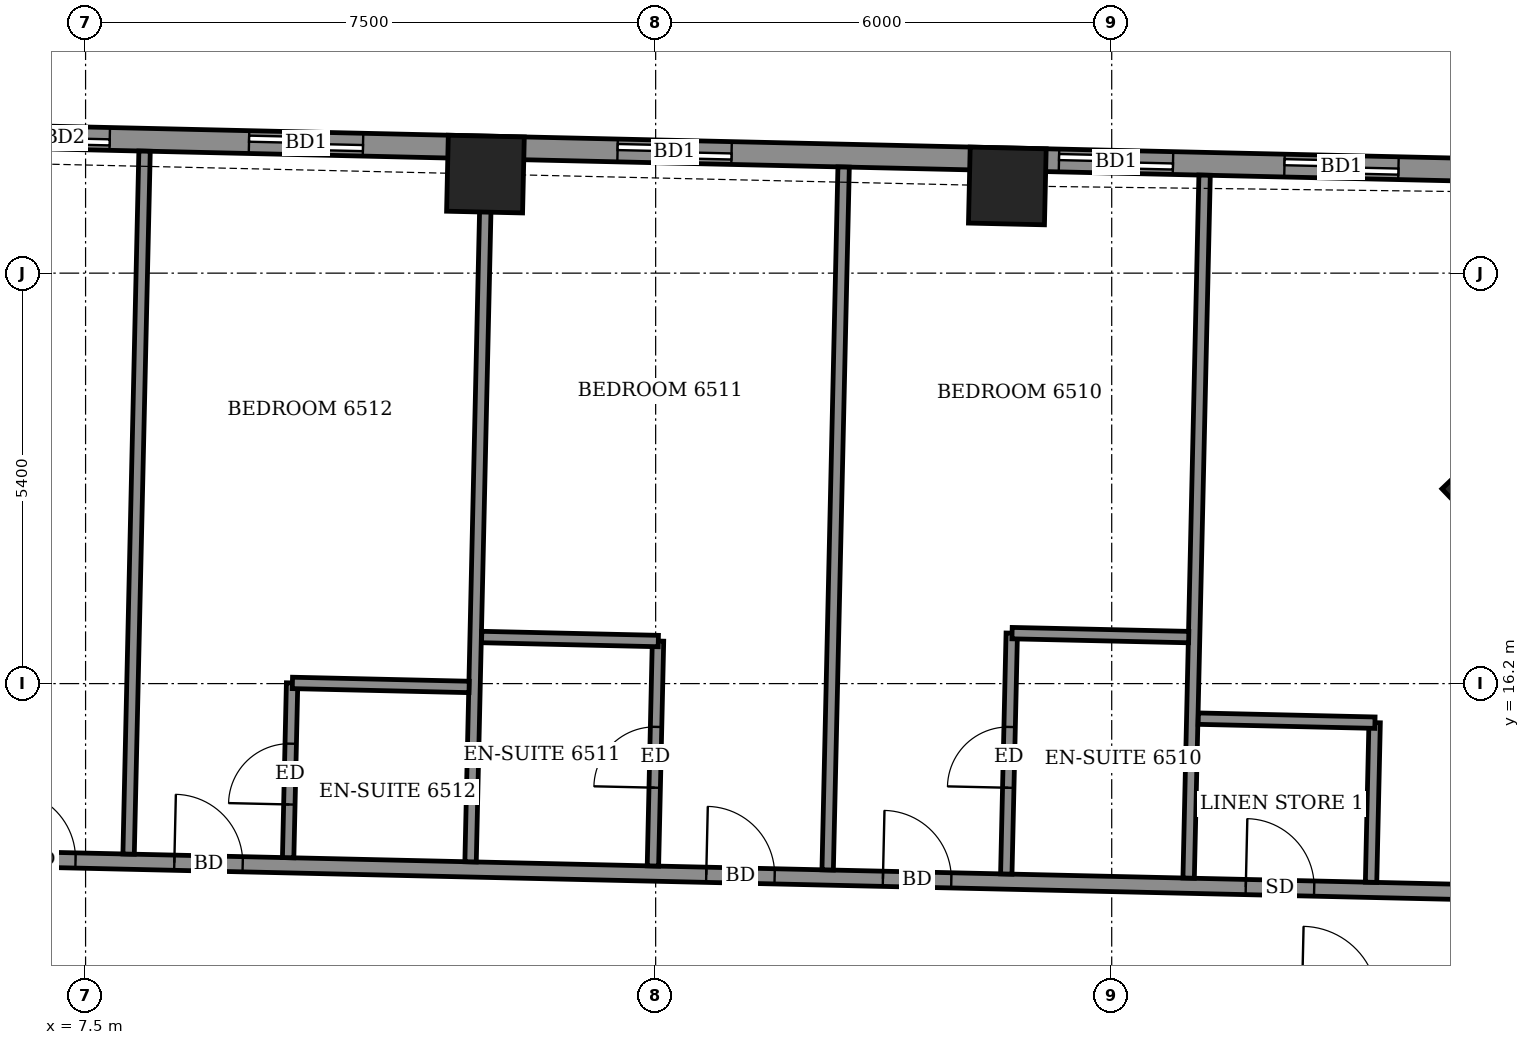
"""IFC4 building model, lengths in metres.
Left out: names, types, materials, properties, quantities, classifications, styles, units other than length and angle.
Written with IfcOpenShell. Run it as: python <this file> out.ifc"""

import sys

from ifc_helpers import new_model, si_unit, direction, frame, frame_2d, origin, origin_2d, place, context, subcontext, project, spatial, rectangle, extrude, element, fill, save


model = new_model("IFC4")
c1 = context("Model", 3, precision=1e-05, world=origin(), true_north=direction((0.0, 1.0)))
c2 = subcontext(c1, "Body", "Model", "MODEL_VIEW")
j1 = project(units=[si_unit("LENGTHUNIT", "METRE"), si_unit("PLANEANGLEUNIT", "RADIAN")], contexts=[c1])
p1 = place(None, origin())
s1 = spatial("IfcSite", under=j1, at=p1, CompositionType="ELEMENT")
p2 = place(p1, origin())
s2 = spatial("IfcBuilding", under=s1, at=p2, CompositionType="ELEMENT")
p3 = place(p2, frame((0.0, 0.0, 257.3)))
s3 = spatial("IfcBuildingStorey", under=s2, at=p3, CompositionType="ELEMENT", Elevation=257.3)
for number, where, z_axis, x_axis in (
    (1, (26.052, 18.747, -0.55), (0.0, 0.0, 1.0), (-0.691, 0.723, 0.0)),
    (2, (19.627, 22.747, -0.55), (0.0, 0.0, 1.0), (-1.0, 0.023, 0.0)),
    (3, (12.761, 22.903, -0.55), (0.0, 0.0, 1.0), (-1.0, 0.023, 0.0)),
):
    element("IfcColumn", number, at=place(p3, frame(where, z_axis=z_axis, x_axis=x_axis)), inside=s3, PredefinedType="COLUMN", context=c2, shape_type="SweptSolid", body=[
        extrude(rectangle(XDim=1.0, YDim=1.0, at=origin_2d()), origin(), (0.0, 0.0, 1.0), 3.6),
    ])
p4 = place(p3, frame((26.35, 22.945, 0.0), z_axis=(0.0, 0.0, 1.0), x_axis=(-0.999742523712, 0.022691105788, 0.0)))
e4 = element("IfcWall", 4, at=p4, inside=s3, PredefinedType="SOLIDWALL", context=c2, shape_type="SweptSolid", body=[
    extrude(rectangle(XDim=47.771, YDim=0.3, at=frame_2d((23.886, 0.0))), origin(), (0.0, 0.0, 1.0), 2.55),
])
p5 = place(p4, frame((1.578, 0.0, 0.0)))
e5 = element("IfcOpeningElement", 5, at=p5, cuts=e4, PredefinedType="OPENING", context=c2, shape_type="SweptSolid", body=[
    extrude(rectangle(XDim=1.5, YDim=2.4, at=frame_2d((0.75, 1.2))), frame((0.0, 0.16, 0.0), z_axis=(0.0, -1.0, 0.0), x_axis=(1.0, 0.0, 0.0)), (0.0, 0.0, 1.0), 0.32),
])
p6 = place(p4, frame((4.545, 0.0, 0.0)))
e6 = element("IfcOpeningElement", 6, at=p6, cuts=e4, PredefinedType="OPENING", context=c2, shape_type="SweptSolid", body=[
    extrude(rectangle(XDim=1.5, YDim=2.4, at=frame_2d((0.75, 1.2))), frame((0.0, 0.16, 0.0), z_axis=(0.0, -1.0, 0.0), x_axis=(1.0, 0.0, 0.0)), (0.0, 0.0, 1.0), 0.32),
])
p7 = place(p4, frame((10.354, 0.0, 0.0)))
e7 = element("IfcOpeningElement", 7, at=p7, cuts=e4, PredefinedType="OPENING", context=c2, shape_type="SweptSolid", body=[
    extrude(rectangle(XDim=1.5, YDim=2.4, at=frame_2d((0.75, 1.2))), frame((0.0, 0.16, 0.0), z_axis=(0.0, -1.0, 0.0), x_axis=(1.0, 0.0, 0.0)), (0.0, 0.0, 1.0), 0.32),
])
p8 = place(p4, frame((15.204, 0.0, 0.0)))
e8 = element("IfcOpeningElement", 8, at=p8, cuts=e4, PredefinedType="OPENING", context=c2, shape_type="SweptSolid", body=[
    extrude(rectangle(XDim=1.5, YDim=2.4, at=frame_2d((0.75, 1.2))), frame((0.0, 0.16, 0.0), z_axis=(0.0, -1.0, 0.0), x_axis=(1.0, 0.0, 0.0)), (0.0, 0.0, 1.0), 0.32),
])
p9 = place(p4, frame((18.537, 0.0, 0.0)))
e9 = element("IfcOpeningElement", 9, at=p9, cuts=e4, PredefinedType="OPENING", context=c2, shape_type="SweptSolid", body=[
    extrude(rectangle(XDim=1.2, YDim=2.4, at=frame_2d((0.6, 1.2))), frame((0.0, 0.16, 0.0), z_axis=(0.0, -1.0, 0.0), x_axis=(1.0, 0.0, 0.0)), (0.0, 0.0, 1.0), 0.32),
])
p10 = place(p4, frame((24.171, 0.0, 0.0)))
e10 = element("IfcOpeningElement", 10, at=p10, cuts=e4, PredefinedType="OPENING", context=c2, shape_type="SweptSolid", body=[
    extrude(rectangle(XDim=1.5, YDim=2.4, at=frame_2d((0.75, 1.2))), frame((0.0, 0.16, 0.0), z_axis=(0.0, -1.0, 0.0), x_axis=(1.0, 0.0, 0.0)), (0.0, 0.0, 1.0), 0.32),
])
p11 = place(p4, frame((28.871, 0.0, 0.0)))
e11 = element("IfcOpeningElement", 11, at=p11, cuts=e4, PredefinedType="OPENING", context=c2, shape_type="SweptSolid", body=[
    extrude(rectangle(XDim=1.5, YDim=2.4, at=frame_2d((0.75, 1.2))), frame((0.0, 0.16, 0.0), z_axis=(0.0, -1.0, 0.0), x_axis=(1.0, 0.0, 0.0)), (0.0, 0.0, 1.0), 0.32),
])
p12 = place(p4, frame((32.055, 0.0, 0.0)))
e12 = element("IfcOpeningElement", 12, at=p12, cuts=e4, PredefinedType="OPENING", context=c2, shape_type="SweptSolid", body=[
    extrude(rectangle(XDim=1.5, YDim=2.4, at=frame_2d((0.75, 1.2))), frame((0.0, 0.16, 0.0), z_axis=(0.0, -1.0, 0.0), x_axis=(1.0, 0.0, 0.0)), (0.0, 0.0, 1.0), 0.32),
])
p13 = place(p4, frame((37.813, 0.0, 0.0)))
e13 = element("IfcOpeningElement", 13, at=p13, cuts=e4, PredefinedType="OPENING", context=c2, shape_type="SweptSolid", body=[
    extrude(rectangle(XDim=1.5, YDim=2.4, at=frame_2d((0.75, 1.2))), frame((0.0, 0.16, 0.0), z_axis=(0.0, -1.0, 0.0), x_axis=(1.0, 0.0, 0.0)), (0.0, 0.0, 1.0), 0.32),
])
p14 = place(p4, frame((43.052, 0.0, 0.9)))
e14 = element("IfcOpeningElement", 14, at=p14, cuts=e4, PredefinedType="OPENING", context=c2, shape_type="SweptSolid", body=[
    extrude(rectangle(XDim=2.4, YDim=1.5, at=frame_2d((1.2, 0.75))), frame((0.0, 0.16, 0.0), z_axis=(0.0, -1.0, 0.0), x_axis=(1.0, 0.0, 0.0)), (0.0, 0.0, 1.0), 0.32),
])
p15 = place(p3, frame((-24.474, 14.596, 0.0), z_axis=(0.0, 0.0, 1.0), x_axis=(0.999742424031, -0.022695497208, 0.0)))
e15 = element("IfcWall", 15, at=p15, inside=s3, PredefinedType="PARTITIONING", context=c2, shape_type="SweptSolid", body=[
    extrude(rectangle(XDim=52.872, YDim=0.2, at=frame_2d((26.436, 0.0))), origin(), (0.0, 0.0, 1.0), 3.05),
])
p16 = place(p15, frame((51.336, 0.0, 0.0)))
e16 = element("IfcOpeningElement", 16, at=p16, cuts=e15, PredefinedType="OPENING", context=c2, shape_type="SweptSolid", body=[
    extrude(rectangle(XDim=1.0, YDim=2.1, at=frame_2d((0.5, 1.05))), frame((0.0, 0.11, 0.0), z_axis=(0.0, -1.0, 0.0), x_axis=(1.0, 0.0, 0.0)), (0.0, 0.0, 1.0), 0.22),
])
p17 = place(p15, frame((47.25, 0.0, 0.0)))
e17 = element("IfcOpeningElement", 17, at=p17, cuts=e15, PredefinedType="OPENING", context=c2, shape_type="SweptSolid", body=[
    extrude(rectangle(XDim=0.9, YDim=2.1, at=frame_2d((0.45, 1.05))), frame((0.0, 0.11, 0.0), z_axis=(0.0, -1.0, 0.0), x_axis=(1.0, 0.0, 0.0)), (0.0, 0.0, 1.0), 0.22),
])
p18 = place(p15, frame((42.475, 0.0, 0.0)))
e18 = element("IfcOpeningElement", 18, at=p18, cuts=e15, PredefinedType="OPENING", context=c2, shape_type="SweptSolid", body=[
    extrude(rectangle(XDim=0.9, YDim=2.1, at=frame_2d((0.45, 1.05))), frame((0.0, 0.11, 0.0), z_axis=(0.0, -1.0, 0.0), x_axis=(1.0, 0.0, 0.0)), (0.0, 0.0, 1.0), 0.22),
])
p19 = place(p15, frame((40.15, 0.0, 0.0)))
e19 = element("IfcOpeningElement", 19, at=p19, cuts=e15, PredefinedType="OPENING", context=c2, shape_type="SweptSolid", body=[
    extrude(rectangle(XDim=0.9, YDim=2.1, at=frame_2d((0.45, 1.05))), frame((0.0, 0.11, 0.0), z_axis=(0.0, -1.0, 0.0), x_axis=(1.0, 0.0, 0.0)), (0.0, 0.0, 1.0), 0.22),
])
p20 = place(p15, frame((33.15, 0.0, 0.0)))
e20 = element("IfcOpeningElement", 20, at=p20, cuts=e15, PredefinedType="OPENING", context=c2, shape_type="SweptSolid", body=[
    extrude(rectangle(XDim=0.9, YDim=2.1, at=frame_2d((0.45, 1.05))), frame((0.0, 0.11, 0.0), z_axis=(0.0, -1.0, 0.0), x_axis=(1.0, 0.0, 0.0)), (0.0, 0.0, 1.0), 0.22),
])
p21 = place(p15, frame((30.95, 0.0, 0.0)))
e21 = element("IfcOpeningElement", 21, at=p21, cuts=e15, PredefinedType="OPENING", context=c2, shape_type="SweptSolid", body=[
    extrude(rectangle(XDim=0.9, YDim=2.1, at=frame_2d((0.45, 1.05))), frame((0.0, 0.11, 0.0), z_axis=(0.0, -1.0, 0.0), x_axis=(1.0, 0.0, 0.0)), (0.0, 0.0, 1.0), 0.22),
])
p22 = place(p15, frame((23.975, 0.0, 0.0)))
e22 = element("IfcOpeningElement", 22, at=p22, cuts=e15, PredefinedType="OPENING", context=c2, shape_type="SweptSolid", body=[
    extrude(rectangle(XDim=0.9, YDim=2.1, at=frame_2d((0.45, 1.05))), frame((0.0, 0.11, 0.0), z_axis=(0.0, -1.0, 0.0), x_axis=(1.0, 0.0, 0.0)), (0.0, 0.0, 1.0), 0.22),
])
p23 = place(p15, frame((21.925, 0.0, 0.0)))
e23 = element("IfcOpeningElement", 23, at=p23, cuts=e15, PredefinedType="OPENING", context=c2, shape_type="SweptSolid", body=[
    extrude(rectangle(XDim=0.9, YDim=2.1, at=frame_2d((0.45, 1.05))), frame((0.0, 0.11, 0.0), z_axis=(0.0, -1.0, 0.0), x_axis=(1.0, 0.0, 0.0)), (0.0, 0.0, 1.0), 0.22),
])
p24 = place(p15, frame((14.975, 0.0, 0.0)))
e24 = element("IfcOpeningElement", 24, at=p24, cuts=e15, PredefinedType="OPENING", context=c2, shape_type="SweptSolid", body=[
    extrude(rectangle(XDim=0.9, YDim=2.1, at=frame_2d((0.45, 1.05))), frame((0.0, 0.11, 0.0), z_axis=(0.0, -1.0, 0.0), x_axis=(1.0, 0.0, 0.0)), (0.0, 0.0, 1.0), 0.22),
])
p25 = place(p15, frame((12.65, 0.0, 0.0)))
e25 = element("IfcOpeningElement", 25, at=p25, cuts=e15, PredefinedType="OPENING", context=c2, shape_type="SweptSolid", body=[
    extrude(rectangle(XDim=0.9, YDim=2.1, at=frame_2d((0.45, 1.05))), frame((0.0, 0.11, 0.0), z_axis=(0.0, -1.0, 0.0), x_axis=(1.0, 0.0, 0.0)), (0.0, 0.0, 1.0), 0.22),
])
p26 = place(p15, frame((2.0, 0.0, 0.0)))
e26 = element("IfcOpeningElement", 26, at=p26, cuts=e15, PredefinedType="OPENING", context=c2, shape_type="SweptSolid", body=[
    extrude(rectangle(XDim=1.0, YDim=2.1, at=frame_2d((0.5, 1.05))), frame((0.0, 0.11, 0.0), z_axis=(0.0, -1.0, 0.0), x_axis=(1.0, 0.0, 0.0)), (0.0, 0.0, 1.0), 0.22),
])
p27 = place(p15, frame((7.75, 0.0, 0.0)))
e27 = element("IfcOpeningElement", 27, at=p27, cuts=e15, PredefinedType="OPENING", context=c2, shape_type="SweptSolid", body=[
    extrude(rectangle(XDim=0.9, YDim=2.1, at=frame_2d((0.45, 1.05))), frame((0.0, 0.11, 0.0), z_axis=(0.0, -1.0, 0.0), x_axis=(1.0, 0.0, 0.0)), (0.0, 0.0, 1.0), 0.22),
])
p28 = place(p3, frame((8.066, 13.957, 0.0), z_axis=(0.0, 0.0, 1.0), x_axis=(0.022697424684, 0.999742380272, 0.0)))
e28 = element("IfcWall", 28, at=p28, inside=s3, PredefinedType="PARTITIONING", context=c2, shape_type="SweptSolid", body=[
    extrude(rectangle(XDim=9.25, YDim=0.15, at=frame_2d((4.625, 0.0))), origin(), (0.0, 0.0, 1.0), 2.55),
])
p29 = place(p3, frame((10.165, 13.91, 0.0), z_axis=(0.0, 0.0, 1.0), x_axis=(0.022612884682, 0.999744296031, 0.0)))
e29 = element("IfcWall", 29, at=p29, inside=s3, PredefinedType="PARTITIONING", context=c2, shape_type="SweptSolid", body=[
    extrude(rectangle(XDim=2.3, YDim=0.15, at=frame_2d((1.15, 0.0))), origin(), (0.0, 0.0, 1.0), 3.05),
])
p30 = place(p29, frame((0.7, 0.0, 0.0)))
e30 = element("IfcOpeningElement", 30, at=p30, cuts=e29, PredefinedType="OPENING", context=c2, shape_type="SweptSolid", body=[
    extrude(rectangle(XDim=0.8, YDim=2.1, at=frame_2d((0.4, 1.05))), frame((0.0, 0.085, 0.0), z_axis=(0.0, -1.0, 0.0), x_axis=(1.0, 0.0, 0.0)), (0.0, 0.0, 1.0), 0.17),
])
p31 = place(p3, frame((12.565, 13.855, 0.0), z_axis=(0.0, 0.0, 1.0), x_axis=(0.022591909275, 0.999744770247, 0.0)))
e31 = element("IfcWall", 31, at=p31, inside=s3, PredefinedType="PARTITIONING", context=c2, shape_type="SweptSolid", body=[
    extrude(rectangle(XDim=9.25, YDim=0.15, at=frame_2d((4.625, 0.0))), origin(), (0.0, 0.0, 1.0), 3.05),
])
p32 = place(p3, frame((14.964, 13.801, 0.0), z_axis=(0.0, 0.0, 1.0), x_axis=(0.022601485787, 0.999744553794, 0.0)))
e32 = element("IfcWall", 32, at=p32, inside=s3, PredefinedType="PARTITIONING", context=c2, shape_type="SweptSolid", body=[
    extrude(rectangle(XDim=2.96, YDim=0.15, at=frame_2d((1.48, 0.0))), origin(), (0.0, 0.0, 1.0), 3.05),
])
p33 = place(p32, frame((1.03, 0.0, 0.0)))
e33 = element("IfcOpeningElement", 33, at=p33, cuts=e32, PredefinedType="OPENING", context=c2, shape_type="SweptSolid", body=[
    extrude(rectangle(XDim=0.8, YDim=2.1, at=frame_2d((0.4, 1.05))), frame((0.0, 0.085, 0.0), z_axis=(0.0, -1.0, 0.0), x_axis=(1.0, 0.0, 0.0)), (0.0, 0.0, 1.0), 0.17),
])
p34 = place(p3, frame((17.263, 13.749, 0.0), z_axis=(0.0, 0.0, 1.0), x_axis=(0.022699820474, 0.999742325877, 0.0)))
e34 = element("IfcWall", 34, at=p34, inside=s3, PredefinedType="PARTITIONING", context=c2, shape_type="SweptSolid", body=[
    extrude(rectangle(XDim=9.25, YDim=0.15, at=frame_2d((4.625, 0.0))), origin(), (0.0, 0.0, 1.0), 2.55),
])
p35 = place(p3, frame((19.613, 13.695, 0.0), z_axis=(0.0, 0.0, 1.0), x_axis=(0.022721405353, 0.999741835545, 0.0)))
e35 = element("IfcWall", 35, at=p35, inside=s3, PredefinedType="PARTITIONING", context=c2, shape_type="SweptSolid", body=[
    extrude(rectangle(XDim=3.17, YDim=0.15, at=frame_2d((1.585, 0.0))), origin(), (0.0, 0.0, 1.0), 3.05),
])
p36 = place(p35, frame((1.135, 0.0, 0.0)))
e36 = element("IfcOpeningElement", 36, at=p36, cuts=e35, PredefinedType="OPENING", context=c2, shape_type="SweptSolid", body=[
    extrude(rectangle(XDim=0.8, YDim=2.1, at=frame_2d((0.4, 1.05))), frame((0.0, 0.085, 0.0), z_axis=(0.0, -1.0, 0.0), x_axis=(1.0, 0.0, 0.0)), (0.0, 0.0, 1.0), 0.17),
])
p37 = place(p3, frame((22.012, 13.641, 0.0), z_axis=(0.0, 0.0, 1.0), x_axis=(0.022698023584, 0.999742366675, 0.0)))
e37 = element("IfcWall", 37, at=p37, inside=s3, PredefinedType="PARTITIONING", context=c2, shape_type="SweptSolid", body=[
    extrude(rectangle(XDim=9.25, YDim=0.15, at=frame_2d((4.625, 0.0))), origin(), (0.0, 0.0, 1.0), 2.55),
])
p38 = place(p3, frame((24.412, 13.586, 0.0), z_axis=(0.0, 0.0, 1.0), x_axis=(0.022314832676, 0.999750993119, 0.0)))
e38 = element("IfcWall", 38, at=p38, inside=s3, PredefinedType="PARTITIONING", context=c2, shape_type="SweptSolid", body=[
    extrude(rectangle(XDim=2.101, YDim=0.15, at=frame_2d((1.05, 0.0))), origin(), (0.0, 0.0, 1.0), 3.05),
])
p39 = place(p3, frame((22.139, 15.739, 0.0), z_axis=(0.0, 0.0, 1.0), x_axis=(0.999740260747, -0.02279059109, 0.0)))
e39 = element("IfcWall", 39, at=p39, inside=s3, PredefinedType="PARTITIONING", context=c2, shape_type="SweptSolid", body=[
    extrude(rectangle(XDim=2.324, YDim=0.15, at=frame_2d((1.162, 0.0))), origin(), (0.0, 0.0, 1.0), 3.05),
])
p40 = place(p3, frame((10.221, 16.209, 0.0), z_axis=(0.0, 0.0, 1.0), x_axis=(0.999740478815, -0.022781023197, 0.0)))
e40 = element("IfcWall", 40, at=p40, inside=s3, PredefinedType="PARTITIONING", context=c2, shape_type="SweptSolid", body=[
    extrude(rectangle(XDim=2.325, YDim=0.15, at=frame_2d((1.163, 0.0))), origin(), (0.0, 0.0, 1.0), 3.05),
])
for number, where, z_axis, x_axis in (
    (41, (12.711, 16.813, 0.0), (0.0, 0.0, 1.0), (1.0, -0.023, 0.0)),
    (42, (19.689, 16.864, 0.0), (0.0, 0.0, 1.0), (1.0, -0.022, 0.0)),
):
    element("IfcWall", number, at=place(p3, frame(where, z_axis=z_axis, x_axis=x_axis)), inside=s3, PredefinedType="PARTITIONING", context=c2, shape_type="SweptSolid", body=[
        extrude(rectangle(XDim=2.324, YDim=0.15, at=frame_2d((1.162, 0.0))), origin(), (0.0, 0.0, 1.0), 3.05),
    ])
p41 = place(p5, origin())
e43 = element("IfcDoor", 43, at=p41, inside=s3, OperationType="SLIDING_TO_LEFT", PredefinedType="DOOR", context=c2, shape_type="SweptSolid", body=[
    extrude(rectangle(XDim=1.5, YDim=2.4, at=frame_2d((0.75, 1.2))), frame((0.0, 0.025, 0.0), z_axis=(0.0, -1.0, 0.0), x_axis=(1.0, 0.0, 0.0)), (0.0, 0.0, 1.0), 0.05),
])
fill(e5, e43)
p42 = place(p6, origin())
e44 = element("IfcDoor", 44, at=p42, inside=s3, OperationType="SLIDING_TO_LEFT", PredefinedType="DOOR", context=c2, shape_type="SweptSolid", body=[
    extrude(rectangle(XDim=1.5, YDim=2.4, at=frame_2d((0.75, 1.2))), frame((0.0, 0.025, 0.0), z_axis=(0.0, -1.0, 0.0), x_axis=(1.0, 0.0, 0.0)), (0.0, 0.0, 1.0), 0.05),
])
fill(e6, e44)
p43 = place(p7, origin())
e45 = element("IfcDoor", 45, at=p43, inside=s3, OperationType="SLIDING_TO_LEFT", PredefinedType="DOOR", context=c2, shape_type="SweptSolid", body=[
    extrude(rectangle(XDim=1.5, YDim=2.4, at=frame_2d((0.75, 1.2))), frame((0.0, 0.025, 0.0), z_axis=(0.0, -1.0, 0.0), x_axis=(1.0, 0.0, 0.0)), (0.0, 0.0, 1.0), 0.05),
])
fill(e7, e45)
p44 = place(p8, origin())
e46 = element("IfcDoor", 46, at=p44, inside=s3, OperationType="SLIDING_TO_LEFT", PredefinedType="DOOR", context=c2, shape_type="SweptSolid", body=[
    extrude(rectangle(XDim=1.5, YDim=2.4, at=frame_2d((0.75, 1.2))), frame((0.0, 0.025, 0.0), z_axis=(0.0, -1.0, 0.0), x_axis=(1.0, 0.0, 0.0)), (0.0, 0.0, 1.0), 0.05),
])
fill(e8, e46)
p45 = place(p9, origin())
e47 = element("IfcDoor", 47, at=p45, inside=s3, OperationType="SLIDING_TO_LEFT", PredefinedType="DOOR", context=c2, shape_type="SweptSolid", body=[
    extrude(rectangle(XDim=1.2, YDim=2.4, at=frame_2d((0.6, 1.2))), frame((0.0, 0.025, 0.0), z_axis=(0.0, -1.0, 0.0), x_axis=(1.0, 0.0, 0.0)), (0.0, 0.0, 1.0), 0.05),
])
fill(e9, e47)
p46 = place(p17, origin())
e48 = element("IfcDoor", 48, at=p46, inside=s3, OperationType="SINGLE_SWING_LEFT", PredefinedType="DOOR", context=c2, shape_type="SweptSolid", body=[
    extrude(rectangle(XDim=0.9, YDim=2.1, at=frame_2d((0.45, 1.05))), frame((0.0, 0.025, 0.0), z_axis=(0.0, -1.0, 0.0), x_axis=(1.0, 0.0, 0.0)), (0.0, 0.0, 1.0), 0.05),
])
fill(e17, e48)
p47 = place(p18, origin())
e49 = element("IfcDoor", 49, at=p47, inside=s3, OperationType="SINGLE_SWING_RIGHT", PredefinedType="DOOR", context=c2, shape_type="SweptSolid", body=[
    extrude(rectangle(XDim=0.9, YDim=2.1, at=frame_2d((0.45, 1.05))), frame((0.0, 0.025, 0.0), z_axis=(0.0, -1.0, 0.0), x_axis=(1.0, 0.0, 0.0)), (0.0, 0.0, 1.0), 0.05),
])
fill(e18, e49)
p48 = place(p36, origin())
e50 = element("IfcDoor", 50, at=p48, inside=s3, OperationType="SINGLE_SWING_RIGHT", PredefinedType="DOOR", context=c2, shape_type="SweptSolid", body=[
    extrude(rectangle(XDim=0.8, YDim=2.1, at=frame_2d((0.4, 1.05))), frame((0.0, 0.025, 0.0), z_axis=(0.0, -1.0, 0.0), x_axis=(1.0, 0.0, 0.0)), (0.0, 0.0, 1.0), 0.05),
])
fill(e36, e50)
p49 = place(p19, origin())
e51 = element("IfcDoor", 51, at=p49, inside=s3, OperationType="SINGLE_SWING_LEFT", PredefinedType="DOOR", context=c2, shape_type="SweptSolid", body=[
    extrude(rectangle(XDim=0.9, YDim=2.1, at=frame_2d((0.45, 1.05))), frame((0.0, 0.025, 0.0), z_axis=(0.0, -1.0, 0.0), x_axis=(1.0, 0.0, 0.0)), (0.0, 0.0, 1.0), 0.05),
])
fill(e19, e51)
p50 = place(p33, origin())
e52 = element("IfcDoor", 52, at=p50, inside=s3, OperationType="SINGLE_SWING_LEFT", PredefinedType="DOOR", context=c2, shape_type="SweptSolid", body=[
    extrude(rectangle(XDim=0.8, YDim=2.1, at=frame_2d((0.4, 1.05))), frame((0.0, 0.025, 0.0), z_axis=(0.0, -1.0, 0.0), x_axis=(1.0, 0.0, 0.0)), (0.0, 0.0, 1.0), 0.05),
])
fill(e33, e52)
p51 = place(p20, origin())
e53 = element("IfcDoor", 53, at=p51, inside=s3, OperationType="SINGLE_SWING_RIGHT", PredefinedType="DOOR", context=c2, shape_type="SweptSolid", body=[
    extrude(rectangle(XDim=0.9, YDim=2.1, at=frame_2d((0.45, 1.05))), frame((0.0, 0.025, 0.0), z_axis=(0.0, -1.0, 0.0), x_axis=(1.0, 0.0, 0.0)), (0.0, 0.0, 1.0), 0.05),
])
fill(e20, e53)
p52 = place(p30, origin())
e54 = element("IfcDoor", 54, at=p52, inside=s3, OperationType="SINGLE_SWING_RIGHT", PredefinedType="DOOR", context=c2, shape_type="SweptSolid", body=[
    extrude(rectangle(XDim=0.8, YDim=2.1, at=frame_2d((0.4, 1.05))), frame((0.0, 0.025, 0.0), z_axis=(0.0, -1.0, 0.0), x_axis=(1.0, 0.0, 0.0)), (0.0, 0.0, 1.0), 0.05),
])
fill(e30, e54)
p53 = place(p21, origin())
e55 = element("IfcDoor", 55, at=p53, inside=s3, OperationType="SINGLE_SWING_LEFT", PredefinedType="DOOR", context=c2, shape_type="SweptSolid", body=[
    extrude(rectangle(XDim=0.9, YDim=2.1, at=frame_2d((0.45, 1.05))), frame((0.0, 0.025, 0.0), z_axis=(0.0, -1.0, 0.0), x_axis=(1.0, 0.0, 0.0)), (0.0, 0.0, 1.0), 0.05),
])
fill(e21, e55)
save(model, sys.argv[1])
